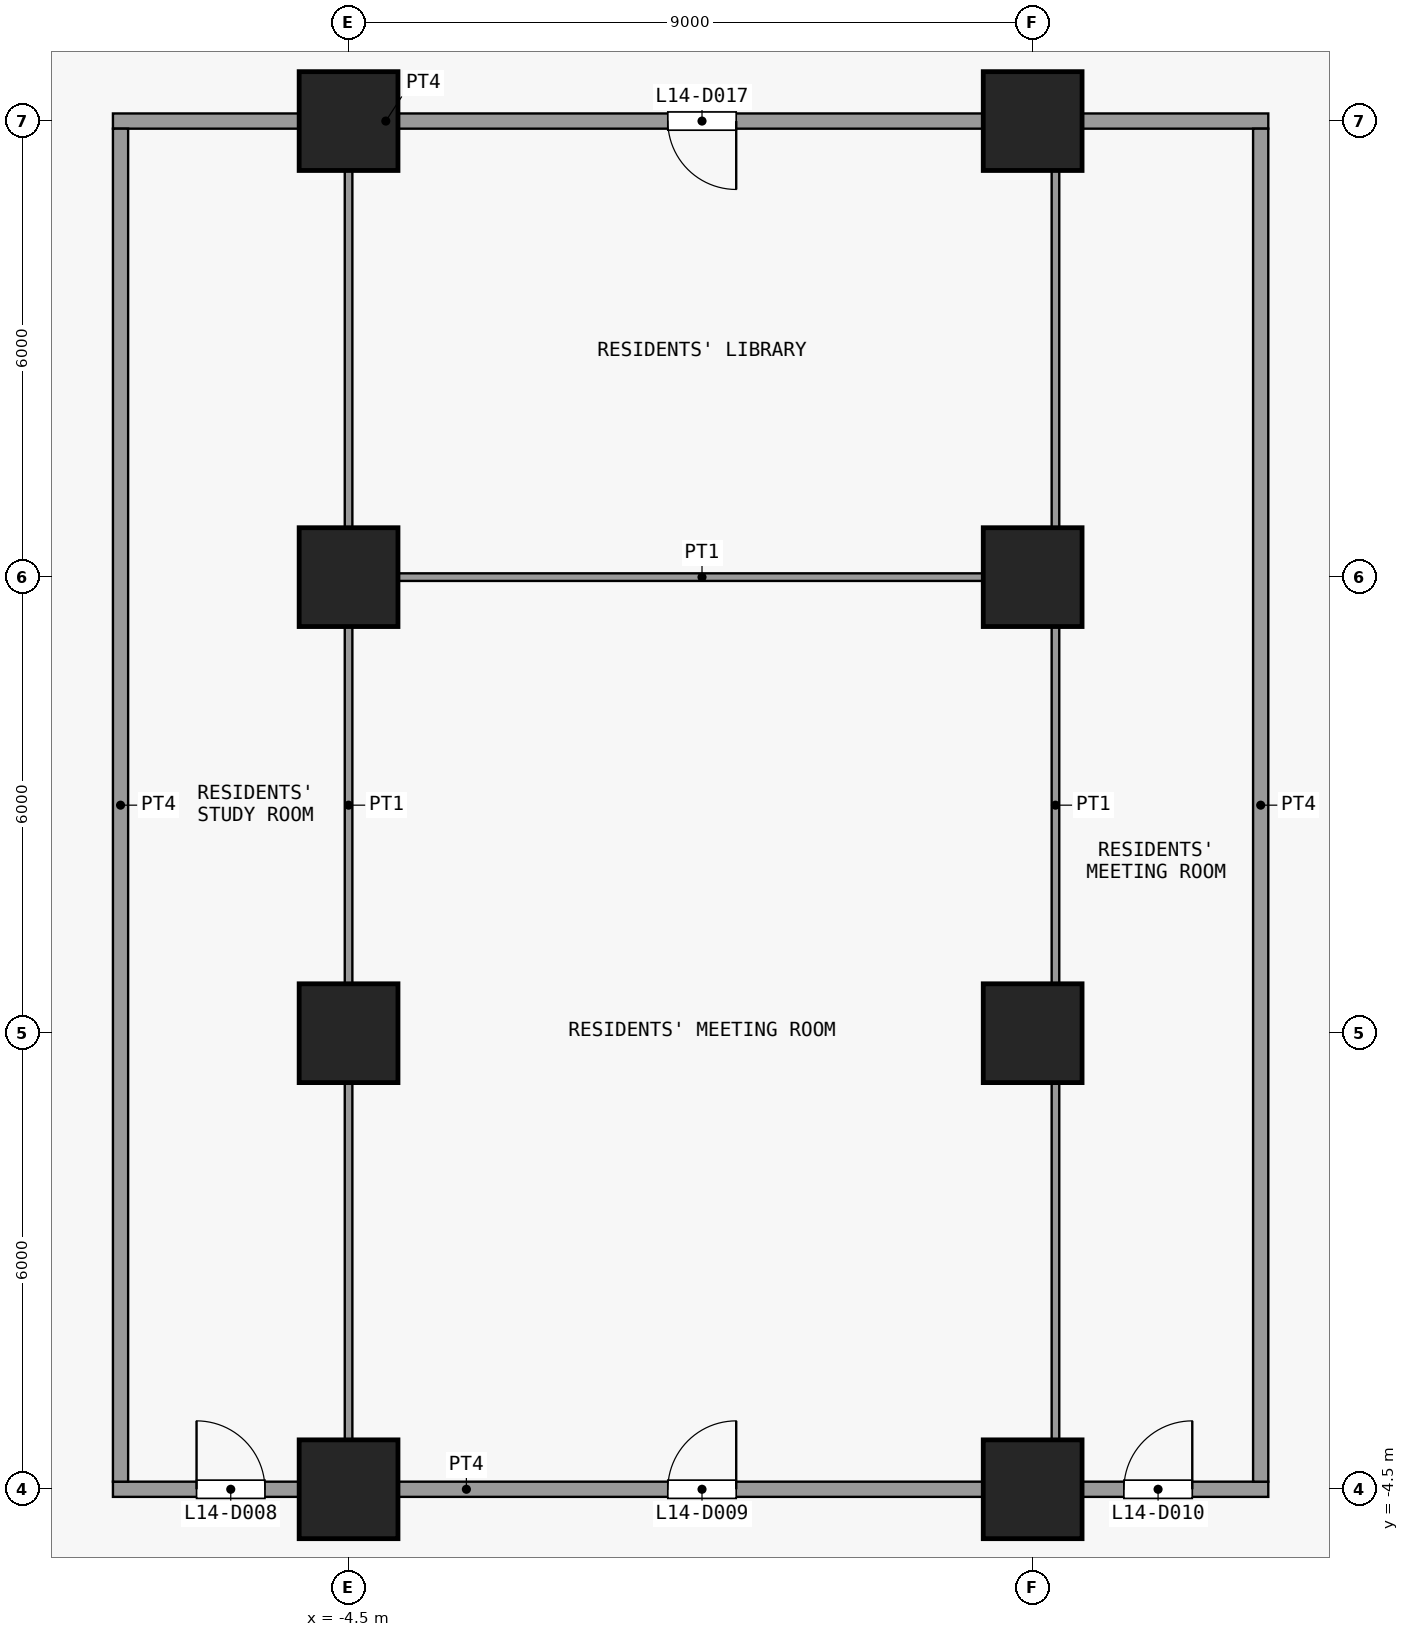
"""IFC4 building model, lengths in metres.
Left out: names, types, materials, properties, quantities, classifications, styles, units other than length and angle.
Written with IfcOpenShell. Run it as: python <this file> out.ifc"""

import sys

from ifc_helpers import new_model, si_unit, direction, frame, frame_2d, origin, origin_2d, place, context, subcontext, project, spatial, rectangle, extrude, element, fill, save


model = new_model("IFC4")
c1 = context("Model", 3, precision=1e-05, world=origin(), true_north=direction((0.0, 1.0)))
c2 = subcontext(c1, "Body", "Model", "MODEL_VIEW")
j1 = project(units=[si_unit("LENGTHUNIT", "METRE"), si_unit("PLANEANGLEUNIT", "RADIAN")], contexts=[c1])
p1 = place(None, origin())
s1 = spatial("IfcSite", under=j1, at=p1, CompositionType="ELEMENT")
p2 = place(p1, origin())
s2 = spatial("IfcBuilding", under=s1, at=p2, CompositionType="ELEMENT")
p3 = place(p2, frame((0.0, 0.0, 61.3)))
s3 = spatial("IfcBuildingStorey", under=s2, at=p3, CompositionType="ELEMENT", Elevation=61.3)
for number, where, z_axis, x_axis in (
    (1, (-4.5, -4.5, 0.0), (0.0, 0.0, 1.0), (1.0, 0.0, 0.0)),
    (2, (-4.5, 1.5, 0.0), (0.0, 0.0, 1.0), (1.0, 0.0, 0.0)),
    (3, (-4.5, 7.5, 0.0), (0.0, 0.0, 1.0), (1.0, 0.0, 0.0)),
    (4, (-4.5, 13.5, 0.0), (0.0, 0.0, 1.0), (1.0, 0.0, 0.0)),
    (5, (4.5, -4.5, 0.0), (0.0, 0.0, 1.0), (1.0, 0.0, 0.0)),
    (6, (4.5, 1.5, 0.0), (0.0, 0.0, 1.0), (1.0, 0.0, 0.0)),
    (7, (4.5, 7.5, 0.0), (0.0, 0.0, 1.0), (1.0, 0.0, 0.0)),
    (8, (4.5, 13.5, 0.0), (0.0, 0.0, 1.0), (1.0, 0.0, 0.0)),
):
    element("IfcColumn", number, at=place(p3, frame(where, z_axis=z_axis, x_axis=x_axis)), inside=s3, PredefinedType="COLUMN", context=c2, shape_type="SweptSolid", body=[
        extrude(rectangle(XDim=1.3, YDim=1.3, at=origin_2d()), origin(), (0.0, 0.0, 1.0), 3.6),
    ])
p4 = place(p3, frame((-7.6, -4.5, 0.0), z_axis=(0.0, 0.0, 1.0), x_axis=(1.0, 0.0, 0.0)))
e9 = element("IfcWall", 9, at=p4, inside=s3, PredefinedType="PARTITIONING", context=c2, shape_type="SweptSolid", body=[
    extrude(rectangle(XDim=15.2, YDim=0.2, at=frame_2d((7.6, 0.0))), origin(), (0.0, 0.0, 1.0), 3.3),
])
p5 = place(p4, frame((1.1, 0.0, 0.0)))
e10 = element("IfcOpeningElement", 10, at=p5, cuts=e9, PredefinedType="OPENING", context=c2, shape_type="SweptSolid", body=[
    extrude(rectangle(XDim=0.9, YDim=2.1, at=frame_2d((0.45, 1.05))), frame((0.0, 0.11, 0.0), z_axis=(0.0, -1.0, 0.0), x_axis=(1.0, 0.0, 0.0)), (0.0, 0.0, 1.0), 0.22),
])
p6 = place(p4, frame((7.3, 0.0, 0.0)))
e11 = element("IfcOpeningElement", 11, at=p6, cuts=e9, PredefinedType="OPENING", context=c2, shape_type="SweptSolid", body=[
    extrude(rectangle(XDim=0.9, YDim=2.1, at=frame_2d((0.45, 1.05))), frame((0.0, 0.11, 0.0), z_axis=(0.0, -1.0, 0.0), x_axis=(1.0, 0.0, 0.0)), (0.0, 0.0, 1.0), 0.22),
])
p7 = place(p4, frame((13.3, 0.0, 0.0)))
e12 = element("IfcOpeningElement", 12, at=p7, cuts=e9, PredefinedType="OPENING", context=c2, shape_type="SweptSolid", body=[
    extrude(rectangle(XDim=0.9, YDim=2.1, at=frame_2d((0.45, 1.05))), frame((0.0, 0.11, 0.0), z_axis=(0.0, -1.0, 0.0), x_axis=(1.0, 0.0, 0.0)), (0.0, 0.0, 1.0), 0.22),
])
p8 = place(p3, frame((-4.45, 7.5, 0.0), z_axis=(0.0, 0.0, 1.0), x_axis=(1.0, 0.0, 0.0)))
e13 = element("IfcWall", 13, at=p8, inside=s3, PredefinedType="PARTITIONING", context=c2, shape_type="SweptSolid", body=[
    extrude(rectangle(XDim=9.2, YDim=0.1, at=frame_2d((4.6, 0.0))), origin(), (0.0, 0.0, 1.0), 3.3),
])
p9 = place(p3, frame((-7.6, 13.5, 0.0), z_axis=(0.0, 0.0, 1.0), x_axis=(1.0, 0.0, 0.0)))
e14 = element("IfcWall", 14, at=p9, inside=s3, PredefinedType="PARTITIONING", context=c2, shape_type="SweptSolid", body=[
    extrude(rectangle(XDim=15.2, YDim=0.2, at=frame_2d((7.6, 0.0))), origin(), (0.0, 0.0, 1.0), 3.3),
])
p10 = place(p9, frame((7.3, 0.0, 0.0)))
e15 = element("IfcOpeningElement", 15, at=p10, cuts=e14, PredefinedType="OPENING", context=c2, shape_type="SweptSolid", body=[
    extrude(rectangle(XDim=0.9, YDim=2.1, at=frame_2d((0.45, 1.05))), frame((0.0, 0.11, 0.0), z_axis=(0.0, -1.0, 0.0), x_axis=(1.0, 0.0, 0.0)), (0.0, 0.0, 1.0), 0.22),
])
p11 = place(p3, frame((-7.5, -4.4, 0.0), z_axis=(0.0, 0.0, 1.0), x_axis=(0.0, 1.0, 0.0)))
e16 = element("IfcWall", 16, at=p11, inside=s3, PredefinedType="PARTITIONING", context=c2, shape_type="SweptSolid", body=[
    extrude(rectangle(XDim=17.8, YDim=0.2, at=frame_2d((8.9, 0.0))), origin(), (0.0, 0.0, 1.0), 3.3),
])
for number, where, z_axis, x_axis in (
    (17, (-4.5, -4.4, 0.0), (0.0, 0.0, 1.0), (0.0, 1.0, 0.0)),
    (18, (4.8, -4.4, 0.0), (0.0, 0.0, 1.0), (0.0, 1.0, 0.0)),
):
    element("IfcWall", number, at=place(p3, frame(where, z_axis=z_axis, x_axis=x_axis)), inside=s3, PredefinedType="PARTITIONING", context=c2, shape_type="SweptSolid", body=[
        extrude(rectangle(XDim=17.8, YDim=0.1, at=frame_2d((8.9, 0.0))), origin(), (0.0, 0.0, 1.0), 3.3),
    ])
p12 = place(p3, frame((7.5, -4.4, 0.0), z_axis=(0.0, 0.0, 1.0), x_axis=(0.0, 1.0, 0.0)))
e19 = element("IfcWall", 19, at=p12, inside=s3, PredefinedType="PARTITIONING", context=c2, shape_type="SweptSolid", body=[
    extrude(rectangle(XDim=17.8, YDim=0.2, at=frame_2d((8.9, 0.0))), origin(), (0.0, 0.0, 1.0), 3.3),
])
p13 = place(p5, origin())
e20 = element("IfcDoor", 20, at=p13, inside=s3, OperationType="SINGLE_SWING_RIGHT", PredefinedType="DOOR", context=c2, shape_type="SweptSolid", body=[
    extrude(rectangle(XDim=0.9, YDim=2.1, at=frame_2d((0.45, 1.05))), frame((0.0, 0.025, 0.0), z_axis=(0.0, -1.0, 0.0), x_axis=(1.0, 0.0, 0.0)), (0.0, 0.0, 1.0), 0.05),
])
fill(e10, e20)
p14 = place(p6, origin())
e21 = element("IfcDoor", 21, at=p14, inside=s3, OperationType="SINGLE_SWING_LEFT", PredefinedType="DOOR", context=c2, shape_type="SweptSolid", body=[
    extrude(rectangle(XDim=0.9, YDim=2.1, at=frame_2d((0.45, 1.05))), frame((0.0, 0.025, 0.0), z_axis=(0.0, -1.0, 0.0), x_axis=(1.0, 0.0, 0.0)), (0.0, 0.0, 1.0), 0.05),
])
fill(e11, e21)
p15 = place(p7, origin())
e22 = element("IfcDoor", 22, at=p15, inside=s3, OperationType="SINGLE_SWING_LEFT", PredefinedType="DOOR", context=c2, shape_type="SweptSolid", body=[
    extrude(rectangle(XDim=0.9, YDim=2.1, at=frame_2d((0.45, 1.05))), frame((0.0, 0.025, 0.0), z_axis=(0.0, -1.0, 0.0), x_axis=(1.0, 0.0, 0.0)), (0.0, 0.0, 1.0), 0.05),
])
fill(e12, e22)
p16 = place(p10, origin())
e23 = element("IfcDoor", 23, at=p16, inside=s3, OperationType="SINGLE_SWING_RIGHT", PredefinedType="DOOR", context=c2, shape_type="SweptSolid", body=[
    extrude(rectangle(XDim=0.9, YDim=2.1, at=frame_2d((0.45, 1.05))), frame((0.0, 0.025, 0.0), z_axis=(0.0, -1.0, 0.0), x_axis=(1.0, 0.0, 0.0)), (0.0, 0.0, 1.0), 0.05),
])
fill(e15, e23)
save(model, sys.argv[1])
